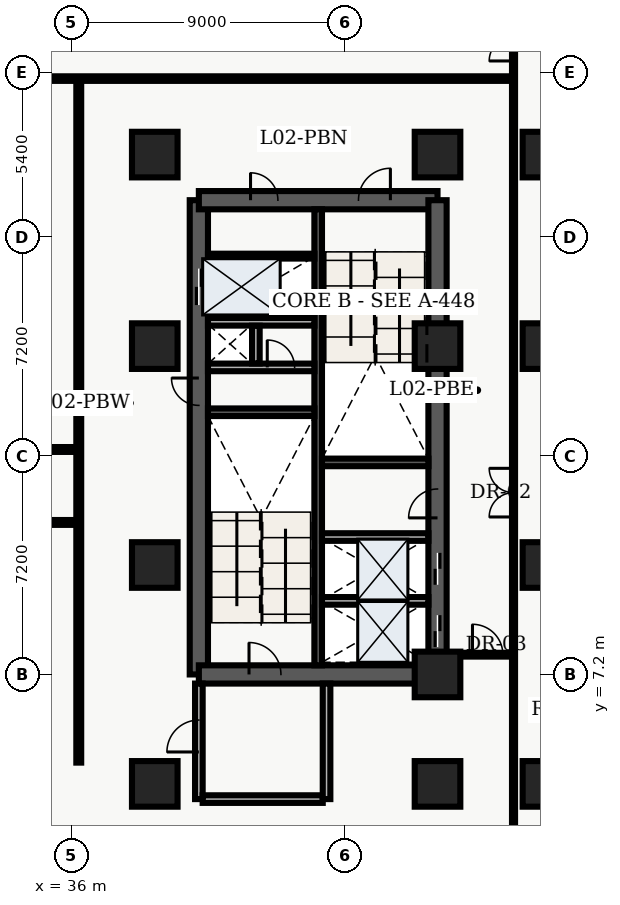
"""IFC4 building model, lengths in metres.
Left out: names, types, materials, properties, quantities, classifications, styles, units other than length and angle.
Written with IfcOpenShell. Run it as: python <this file> out.ifc"""

import sys

from ifc_helpers import new_model, entity, si_unit, converted_unit, direction, frame, origin_with_axes, origin_2d_with_axis, place, context, subcontext, project, spatial, polyline, rectangle, outline, extrude, element, fill, save


model = new_model("IFC4")
c1 = context("Model", 3, precision=1e-05, world=origin_with_axes(), true_north=direction((0.0, 1.0)))
c2 = subcontext(c1, "Body", "Model", "MODEL_VIEW")
j1 = project(units=[si_unit("LENGTHUNIT", "METRE"), converted_unit("PLANEANGLEUNIT", "DEGREE", entity("IfcPlaneAngleMeasure", 0.017), si_unit("PLANEANGLEUNIT", "RADIAN"), dimensions=[0, 0, 0, 0, 0, 0, 0])], contexts=[c1])
p1 = place(None, origin_with_axes())
s1 = spatial("IfcSite", under=j1, at=p1, CompositionType="ELEMENT")
p2 = place(p1, origin_with_axes())
s2 = spatial("IfcBuilding", under=s1, at=p2, CompositionType="ELEMENT")
p3 = place(p2, frame((0.0, 0.0, 10.8), z_axis=(0.0, 0.0, 1.0), x_axis=(1.0, 0.0, 0.0)))
s3 = spatial("IfcBuildingStorey", under=s2, at=p3, CompositionType="ELEMENT", Elevation=10.8)
p4 = place(p3, frame((40.2, 7.2, 0.0), z_axis=(0.0, 0.0, 1.0), x_axis=(0.0, 1.0, 0.0)))
e1 = element("IfcWall", 1, at=p4, inside=s3, PredefinedType="SHEAR", context=c2, shape_type="SweptSolid", body=[
    extrude(outline(polyline([(0.0, -0.3), (15.6, -0.3), (15.6, 0.3), (0.0, 0.3), (0.0, -0.3)])), origin_with_axes(), (0.0, 0.0, 1.0), 4.26),
])
p5 = place(p4, frame((12.75, 0.0, 0.0), z_axis=(0.0, 0.0, 1.0), x_axis=(1.0, 0.0, 0.0)))
e2 = element("IfcOpeningElement", 2, at=p5, cuts=e1, PredefinedType="OPENING", context=c2, shape_type="SweptSolid", body=[
    extrude(rectangle(XDim=1.2, YDim=0.62, at=origin_2d_with_axis()), origin_with_axes(), (0.0, 0.0, 1.0), 2.15),
])
p6 = place(p4, frame((9.3, 0.0, 0.0), z_axis=(0.0, 0.0, 1.0), x_axis=(1.0, 0.0, 0.0)))
e3 = element("IfcOpeningElement", 3, at=p6, cuts=e1, PredefinedType="OPENING", context=c2, shape_type="SweptSolid", body=[
    extrude(rectangle(XDim=0.9, YDim=0.62, at=origin_2d_with_axis()), origin_with_axes(), (0.0, 0.0, 1.0), 2.15),
])
p7 = place(p3, frame((40.2, 7.2, 0.0), z_axis=(0.0, 0.0, 1.0), x_axis=(1.0, 0.0, 0.0)))
e4 = element("IfcWall", 4, at=p7, inside=s3, PredefinedType="SHEAR", context=c2, shape_type="SweptSolid", body=[
    extrude(outline(polyline([(0.0, -0.3), (7.85, -0.3), (7.85, 0.3), (0.0, 0.3), (0.0, -0.3)])), origin_with_axes(), (0.0, 0.0, 1.0), 4.26),
])
p8 = place(p7, frame((2.175, 0.0, 0.0), z_axis=(0.0, 0.0, 1.0), x_axis=(1.0, 0.0, 0.0)))
e5 = element("IfcOpeningElement", 5, at=p8, cuts=e4, PredefinedType="OPENING", context=c2, shape_type="SweptSolid", body=[
    extrude(rectangle(XDim=1.05, YDim=0.62, at=origin_2d_with_axis()), origin_with_axes(), (0.0, 0.0, 1.0), 2.15),
])
p9 = place(p3, frame((40.2, 22.8, 0.0), z_axis=(0.0, 0.0, 1.0), x_axis=(1.0, 0.0, 0.0)))
e6 = element("IfcWall", 6, at=p9, inside=s3, PredefinedType="SHEAR", context=c2, shape_type="SweptSolid", body=[
    extrude(outline(polyline([(0.0, -0.3), (7.85, -0.3), (7.85, 0.3), (0.0, 0.3), (0.0, -0.3)])), origin_with_axes(), (0.0, 0.0, 1.0), 4.26),
])
p10 = place(p9, frame((5.775, 0.0, 0.0), z_axis=(0.0, 0.0, 1.0), x_axis=(1.0, 0.0, 0.0)))
e7 = element("IfcOpeningElement", 7, at=p10, cuts=e6, PredefinedType="OPENING", context=c2, shape_type="SweptSolid", body=[
    extrude(rectangle(XDim=1.05, YDim=0.62, at=origin_2d_with_axis()), origin_with_axes(), (0.0, 0.0, 1.0), 2.15),
])
p11 = place(p9, frame((2.15, 0.0, 0.0), z_axis=(0.0, 0.0, 1.0), x_axis=(1.0, 0.0, 0.0)))
e8 = element("IfcOpeningElement", 8, at=p11, cuts=e6, PredefinedType="OPENING", context=c2, shape_type="SweptSolid", body=[
    extrude(rectangle(XDim=0.9, YDim=0.62, at=origin_2d_with_axis()), origin_with_axes(), (0.0, 0.0, 1.0), 2.15),
])
p12 = place(p3, frame((48.05, 7.2, 0.0), z_axis=(0.0, 0.0, 1.0), x_axis=(0.0, 1.0, 0.0)))
e9 = element("IfcWall", 9, at=p12, inside=s3, PredefinedType="SHEAR", context=c2, shape_type="SweptSolid", body=[
    extrude(outline(polyline([(0.0, -0.3), (15.6, -0.3), (15.6, 0.3), (0.0, 0.3), (0.0, -0.3)])), origin_with_axes(), (0.0, 0.0, 1.0), 4.26),
])
p13 = place(p12, frame((1.425, 0.0, 0.0), z_axis=(0.0, 0.0, 1.0), x_axis=(1.0, 0.0, 0.0)))
e10 = element("IfcOpeningElement", 10, at=p13, cuts=e9, PredefinedType="OPENING", context=c2, shape_type="SweptSolid", body=[
    extrude(rectangle(XDim=1.05, YDim=0.62, at=origin_2d_with_axis()), origin_with_axes(), (0.0, 0.0, 1.0), 2.15),
])
p14 = place(p12, frame((3.475, 0.0, 0.0), z_axis=(0.0, 0.0, 1.0), x_axis=(1.0, 0.0, 0.0)))
e11 = element("IfcOpeningElement", 11, at=p14, cuts=e9, PredefinedType="OPENING", context=c2, shape_type="SweptSolid", body=[
    extrude(rectangle(XDim=1.05, YDim=0.62, at=origin_2d_with_axis()), origin_with_axes(), (0.0, 0.0, 1.0), 2.15),
])
p15 = place(p12, frame((5.625, 0.0, 0.0), z_axis=(0.0, 0.0, 1.0), x_axis=(1.0, 0.0, 0.0)))
e12 = element("IfcOpeningElement", 12, at=p15, cuts=e9, PredefinedType="OPENING", context=c2, shape_type="SweptSolid", body=[
    extrude(rectangle(XDim=0.95, YDim=0.62, at=origin_2d_with_axis()), origin_with_axes(), (0.0, 0.0, 1.0), 2.15),
])
p16 = place(p3, frame((44.125, 7.5, 0.0), z_axis=(0.0, 0.0, 1.0), x_axis=(0.0, 1.0, 0.0)))
e13 = element("IfcWall", 13, at=p16, inside=s3, PredefinedType="SHEAR", context=c2, shape_type="SweptSolid", body=[
    extrude(outline(polyline([(0.0, -0.125), (15.0, -0.125), (15.0, 0.125), (0.0, 0.125), (0.0, -0.125)])), origin_with_axes(), (0.0, 0.0, 1.0), 4.26),
])
for number, where, z_axis, x_axis in (
    (14, (40.5, 15.825, 0.0), (0.0, 0.0, 1.0), (1.0, 0.0, 0.0)),
    (15, (44.25, 14.175, 0.0), (0.0, 0.0, 1.0), (1.0, 0.0, 0.0)),
):
    element("IfcWall", number, at=place(p3, frame(where, z_axis=z_axis, x_axis=x_axis)), inside=s3, PredefinedType="SHEAR", context=c2, shape_type="SweptSolid", body=[
        extrude(outline(polyline([(0.0, -0.125), (3.5, -0.125), (3.5, 0.125), (0.0, 0.125), (0.0, -0.125)])), origin_with_axes(), (0.0, 0.0, 1.0), 4.26),
    ])
p17 = place(p3, frame((40.5, 17.3, 0.0), z_axis=(0.0, 0.0, 1.0), x_axis=(1.0, 0.0, 0.0)))
e16 = element("IfcWall", 16, at=p17, inside=s3, PredefinedType="SOLIDWALL", context=c2, shape_type="SweptSolid", body=[
    extrude(outline(polyline([(0.0, -0.125), (3.5, -0.125), (3.5, 0.125), (0.0, 0.125), (0.0, -0.125)])), origin_with_axes(), (0.0, 0.0, 1.0), 3.3),
])
p18 = place(p17, frame((2.4, 0.0, 0.0), z_axis=(0.0, 0.0, 1.0), x_axis=(1.0, 0.0, 0.0)))
e17 = element("IfcOpeningElement", 17, at=p18, cuts=e16, PredefinedType="OPENING", context=c2, shape_type="SweptSolid", body=[
    extrude(rectangle(XDim=0.9, YDim=0.27, at=origin_2d_with_axis()), origin_with_axes(), (0.0, 0.0, 1.0), 2.15),
])
p19 = place(p3, frame((40.5, 18.8, 0.0), z_axis=(0.0, 0.0, 1.0), x_axis=(1.0, 0.0, 0.0)))
e18 = element("IfcWall", 18, at=p19, inside=s3, PredefinedType="SOLIDWALL", context=c2, shape_type="SweptSolid", body=[
    extrude(outline(polyline([(0.0, -0.125), (3.5, -0.125), (3.5, 0.125), (0.0, 0.125), (0.0, -0.125)])), origin_with_axes(), (0.0, 0.0, 1.0), 3.3),
])
p20 = place(p3, frame((42.075, 17.43, 0.0), z_axis=(0.0, 0.0, 1.0), x_axis=(0.0, 1.0, 0.0)))
e19 = element("IfcWall", 19, at=p20, inside=s3, PredefinedType="SOLIDWALL", context=c2, shape_type="SweptSolid", body=[
    extrude(outline(polyline([(0.0, -0.125), (1.24, -0.125), (1.24, 0.125), (0.0, 0.125), (0.0, -0.125)])), origin_with_axes(), (0.0, 0.0, 1.0), 3.3),
])
p21 = place(p3, frame((40.2, 3.1, 0.0), z_axis=(0.0, 0.0, 1.0), x_axis=(0.0, 1.0, 0.0)))
e20 = element("IfcWall", 20, at=p21, inside=s3, PredefinedType="SOLIDWALL", context=c2, shape_type="SweptSolid", body=[
    extrude(outline(polyline([(0.0, -0.125), (3.8, -0.125), (3.8, 0.125), (0.0, 0.125), (0.0, -0.125)])), origin_with_axes(), (0.0, 0.0, 1.0), 3.3),
])
p22 = place(p21, frame((2.075, 0.0, 0.0), z_axis=(0.0, 0.0, 1.0), x_axis=(1.0, 0.0, 0.0)))
e21 = element("IfcOpeningElement", 21, at=p22, cuts=e20, PredefinedType="OPENING", context=c2, shape_type="SweptSolid", body=[
    extrude(rectangle(XDim=1.05, YDim=0.27, at=origin_2d_with_axis()), origin_with_axes(), (0.0, 0.0, 1.0), 2.15),
])
p23 = place(p3, frame((40.325, 3.1, 0.0), z_axis=(0.0, 0.0, 1.0), x_axis=(1.0, 0.0, 0.0)))
e22 = element("IfcWall", 22, at=p23, inside=s3, PredefinedType="SOLIDWALL", context=c2, shape_type="SweptSolid", body=[
    extrude(outline(polyline([(0.0, -0.125), (3.95, -0.125), (3.95, 0.125), (0.0, 0.125), (0.0, -0.125)])), origin_with_axes(), (0.0, 0.0, 1.0), 3.3),
])
p24 = place(p3, frame((44.4, 3.1, 0.0), z_axis=(0.0, 0.0, 1.0), x_axis=(0.0, 1.0, 0.0)))
e23 = element("IfcWall", 23, at=p24, inside=s3, PredefinedType="SOLIDWALL", context=c2, shape_type="SweptSolid", body=[
    extrude(outline(polyline([(0.0, -0.125), (3.8, -0.125), (3.8, 0.125), (0.0, 0.125), (0.0, -0.125)])), origin_with_axes(), (0.0, 0.0, 1.0), 3.3),
])
for number, where, z_axis, x_axis in (
    (24, (38.75, 3.6, 0.0), (0.0, 0.0, 1.0), (1.0, 0.0, 0.0)),
    (25, (38.75, 10.8, 0.0), (0.0, 0.0, 1.0), (1.0, 0.0, 0.0)),
    (26, (38.75, 18.0, 0.0), (0.0, 0.0, 1.0), (1.0, 0.0, 0.0)),
    (27, (38.75, 24.3, 0.0), (0.0, 0.0, 1.0), (1.0, 0.0, 0.0)),
    (28, (48.05, 3.6, 0.0), (0.0, 0.0, 1.0), (1.0, 0.0, 0.0)),
    (29, (48.05, 7.2, 0.0), (0.0, 0.0, 1.0), (1.0, 0.0, 0.0)),
    (30, (48.05, 18.0, 0.0), (0.0, 0.0, 1.0), (1.0, 0.0, 0.0)),
    (31, (48.05, 24.3, 0.0), (0.0, 0.0, 1.0), (1.0, 0.0, 0.0)),
    (32, (51.6, 3.6, 0.0), (0.0, 0.0, 1.0), (1.0, 0.0, 0.0)),
    (33, (51.6, 10.8, 0.0), (0.0, 0.0, 1.0), (1.0, 0.0, 0.0)),
    (34, (51.6, 18.0, 0.0), (0.0, 0.0, 1.0), (1.0, 0.0, 0.0)),
    (35, (51.6, 24.3, 0.0), (0.0, 0.0, 1.0), (1.0, 0.0, 0.0)),
):
    element("IfcColumn", number, at=place(p3, frame(where, z_axis=z_axis, x_axis=x_axis)), inside=s3, PredefinedType="COLUMN", context=c2, shape_type="SweptSolid", body=[
        extrude(rectangle(XDim=1.5, YDim=1.5, at=origin_2d_with_axis()), origin_with_axes(), (0.0, 0.0, 1.0), 4.5),
    ])
p25 = place(p3, frame((40.5, 20.96, 0.0), z_axis=(0.0, 0.0, 1.0), x_axis=(1.0, 0.0, 0.0)))
e36 = element("IfcWall", 36, at=p25, inside=s3, PredefinedType="PARTITIONING", context=c2, shape_type="SweptSolid", body=[
    extrude(outline(polyline([(0.0, -0.08), (3.5, -0.08), (3.5, 0.08), (0.0, 0.08), (0.0, -0.08)])), origin_with_axes(), (0.0, 0.0, 1.0), 3.2),
])
for number, where, z_axis, x_axis in (
    (37, (44.25, 9.62, 0.0), (0.0, 0.0, 1.0), (1.0, 0.0, 0.0)),
    (38, (44.25, 11.72, 0.0), (0.0, 0.0, 1.0), (1.0, 0.0, 0.0)),
):
    element("IfcWall", number, at=place(p3, frame(where, z_axis=z_axis, x_axis=x_axis)), inside=s3, PredefinedType="SOLIDWALL", context=c2, shape_type="SweptSolid", body=[
        extrude(outline(polyline([(0.0, -0.125), (3.5, -0.125), (3.5, 0.125), (0.0, 0.125), (0.0, -0.125)])), origin_with_axes(), (0.0, 0.0, 1.0), 3.2),
    ])
p26 = place(p3, frame((21.3, 12.2, 0.0), z_axis=(0.0, 0.0, 1.0), x_axis=(1.0, 0.0, 0.0)))
e39 = element("IfcWall", 39, at=p26, inside=s3, PredefinedType="PARTITIONING", context=c2, shape_type="SweptSolid", body=[
    extrude(outline(polyline([(0.0, -0.08), (14.95, -0.08), (14.95, 0.08), (0.0, 0.08), (0.0, -0.08)])), origin_with_axes(), (0.0, 0.0, 1.0), 3.2),
])
p27 = place(p26, frame((8.25, 0.0, 0.0), z_axis=(0.0, 0.0, 1.0), x_axis=(1.0, 0.0, 0.0)))
e40 = element("IfcOpeningElement", 40, at=p27, cuts=e39, PredefinedType="OPENING", context=c2, shape_type="SweptSolid", body=[
    extrude(rectangle(XDim=1.5, YDim=0.18, at=origin_2d_with_axis()), origin_with_axes(), (0.0, 0.0, 1.0), 2.2),
])
p28 = place(p3, frame((21.3, 14.6, 0.0), z_axis=(0.0, 0.0, 1.0), x_axis=(1.0, 0.0, 0.0)))
e41 = element("IfcWall", 41, at=p28, inside=s3, PredefinedType="PARTITIONING", context=c2, shape_type="SweptSolid", body=[
    extrude(outline(polyline([(0.0, -0.08), (14.95, -0.08), (14.95, 0.08), (0.0, 0.08), (0.0, -0.08)])), origin_with_axes(), (0.0, 0.0, 1.0), 3.2),
])
p29 = place(p28, frame((8.25, 0.0, 0.0), z_axis=(0.0, 0.0, 1.0), x_axis=(1.0, 0.0, 0.0)))
e42 = element("IfcOpeningElement", 42, at=p29, cuts=e41, PredefinedType="OPENING", context=c2, shape_type="SweptSolid", body=[
    extrude(rectangle(XDim=1.5, YDim=0.18, at=origin_2d_with_axis()), origin_with_axes(), (0.0, 0.0, 1.0), 2.2),
])
p30 = place(p3, frame((36.25, 4.3, 0.0), z_axis=(0.0, 0.0, 1.0), x_axis=(0.0, 1.0, 0.0)))
e43 = element("IfcWall", 43, at=p30, inside=s3, PredefinedType="PARTITIONING", context=c2, shape_type="SweptSolid", body=[
    extrude(outline(polyline([(0.0, -0.08), (22.5, -0.08), (22.5, 0.08), (0.0, 0.08), (0.0, -0.08)])), origin_with_axes(), (0.0, 0.0, 1.0), 3.2),
])
p31 = place(p3, frame((50.55, 0.38, 0.0), z_axis=(0.0, 0.0, 1.0), x_axis=(0.0, 1.0, 0.0)))
e44 = element("IfcWall", 44, at=p31, inside=s3, PredefinedType="PARTITIONING", context=c2, shape_type="SweptSolid", body=[
    extrude(outline(polyline([(0.0, -0.05), (38.84, -0.05), (38.84, 0.05), (0.0, 0.05), (0.0, -0.05)])), origin_with_axes(), (0.0, 0.0, 1.0), 3.2),
])
p32 = place(p31, frame((12.8, 0.0, 0.0), z_axis=(0.0, 0.0, 1.0), x_axis=(1.0, 0.0, 0.0)))
e45 = element("IfcOpeningElement", 45, at=p32, cuts=e44, PredefinedType="OPENING", context=c2, shape_type="SweptSolid", body=[
    extrude(rectangle(XDim=1.6, YDim=0.12, at=origin_2d_with_axis()), origin_with_axes(), (0.0, 0.0, 1.0), 2.2),
])
p33 = place(p31, frame((27.8, 0.0, 0.0), z_axis=(0.0, 0.0, 1.0), x_axis=(1.0, 0.0, 0.0)))
e46 = element("IfcOpeningElement", 46, at=p33, cuts=e44, PredefinedType="OPENING", context=c2, shape_type="SweptSolid", body=[
    extrude(rectangle(XDim=1.6, YDim=0.12, at=origin_2d_with_axis()), origin_with_axes(), (0.0, 0.0, 1.0), 2.2),
])
p34 = place(p3, frame((48.05, 7.85, 0.0), z_axis=(0.0, 0.0, 1.0), x_axis=(1.0, 0.0, 0.0)))
e47 = element("IfcWall", 47, at=p34, inside=s3, PredefinedType="PARTITIONING", context=c2, shape_type="SweptSolid", body=[
    extrude(outline(polyline([(0.0, -0.062), (2.5, -0.062), (2.5, 0.062), (0.0, 0.062), (0.0, -0.062)])), origin_with_axes(), (0.0, 0.0, 1.0), 3.2),
])
p35 = place(p34, frame((1.65, 0.0, 0.0), z_axis=(0.0, 0.0, 1.0), x_axis=(1.0, 0.0, 0.0)))
e48 = element("IfcOpeningElement", 48, at=p35, cuts=e47, PredefinedType="OPENING", context=c2, shape_type="SweptSolid", body=[
    extrude(rectangle(XDim=1.0, YDim=0.145, at=origin_2d_with_axis()), origin_with_axes(), (0.0, 0.0, 1.0), 2.15),
])
p36 = place(p3, frame((21.3, 26.8, 0.0), z_axis=(0.0, 0.0, 1.0), x_axis=(1.0, 0.0, 0.0)))
e49 = element("IfcWall", 49, at=p36, inside=s3, PredefinedType="PARTITIONING", context=c2, shape_type="SweptSolid", body=[
    extrude(outline(polyline([(0.0, -0.075), (29.25, -0.075), (29.25, 0.075), (0.0, 0.075), (0.0, -0.075)])), origin_with_axes(), (0.0, 0.0, 1.0), 3.2),
])
p37 = place(p12, frame((1.425, 0.0, 0.0), z_axis=(0.0, 0.0, 1.0), x_axis=(1.0, 0.0, 0.0)))
e50 = element("IfcDoor", 50, at=p37, inside=s3, OperationType="SLIDING_TO_LEFT", PredefinedType="DOOR", context=c2, shape_type="SweptSolid", body=[
    extrude(rectangle(XDim=1.05, YDim=0.09, at=origin_2d_with_axis()), origin_with_axes(), (0.0, 0.0, 1.0), 2.15),
])
fill(e10, e50)
p38 = place(p12, frame((3.475, 0.0, 0.0), z_axis=(0.0, 0.0, 1.0), x_axis=(1.0, 0.0, 0.0)))
e51 = element("IfcDoor", 51, at=p38, inside=s3, OperationType="SLIDING_TO_RIGHT", PredefinedType="DOOR", context=c2, shape_type="SweptSolid", body=[
    extrude(rectangle(XDim=1.05, YDim=0.09, at=origin_2d_with_axis()), origin_with_axes(), (0.0, 0.0, 1.0), 2.15),
])
fill(e11, e51)
p39 = place(p4, frame((12.75, 0.0, 0.0), z_axis=(0.0, 0.0, 1.0), x_axis=(1.0, 0.0, 0.0)))
e52 = element("IfcDoor", 52, at=p39, inside=s3, OperationType="DOUBLE_DOOR_SLIDING", PredefinedType="DOOR", context=c2, shape_type="SweptSolid", body=[
    extrude(rectangle(XDim=1.2, YDim=0.09, at=origin_2d_with_axis()), origin_with_axes(), (0.0, 0.0, 1.0), 2.15),
])
fill(e2, e52)
p40 = place(p4, frame((9.3, 0.0, 0.0), z_axis=(0.0, 0.0, 1.0), x_axis=(1.0, 0.0, 0.0)))
e53 = element("IfcDoor", 53, at=p40, inside=s3, OperationType="SINGLE_SWING_RIGHT", PredefinedType="DOOR", context=c2, shape_type="SweptSolid", body=[
    extrude(rectangle(XDim=0.9, YDim=0.09, at=origin_2d_with_axis()), origin_with_axes(), (0.0, 0.0, 1.0), 2.15),
])
fill(e3, e53)
p41 = place(p17, frame((2.4, 0.0, 0.0), z_axis=(0.0, 0.0, 1.0), x_axis=(1.0, 0.0, 0.0)))
e54 = element("IfcDoor", 54, at=p41, inside=s3, OperationType="SINGLE_SWING_LEFT", PredefinedType="DOOR", context=c2, shape_type="SweptSolid", body=[
    extrude(rectangle(XDim=0.9, YDim=0.09, at=origin_2d_with_axis()), origin_with_axes(), (0.0, 0.0, 1.0), 2.15),
])
fill(e17, e54)
p42 = place(p7, frame((2.175, 0.0, 0.0), z_axis=(0.0, 0.0, 1.0), x_axis=(1.0, 0.0, 0.0)))
e55 = element("IfcDoor", 55, at=p42, inside=s3, OperationType="SINGLE_SWING_LEFT", PredefinedType="DOOR", context=c2, shape_type="SweptSolid", body=[
    extrude(rectangle(XDim=1.05, YDim=0.09, at=origin_2d_with_axis()), origin_with_axes(), (0.0, 0.0, 1.0), 2.15),
])
fill(e5, e55)
p43 = place(p9, frame((5.775, 0.0, 0.0), z_axis=(0.0, 0.0, 1.0), x_axis=(1.0, 0.0, 0.0)))
e56 = element("IfcDoor", 56, at=p43, inside=s3, OperationType="SINGLE_SWING_RIGHT", PredefinedType="DOOR", context=c2, shape_type="SweptSolid", body=[
    extrude(rectangle(XDim=1.05, YDim=0.09, at=origin_2d_with_axis()), origin_with_axes(), (0.0, 0.0, 1.0), 2.15),
])
fill(e7, e56)
p44 = place(p21, frame((2.075, 0.0, 0.0), z_axis=(0.0, 0.0, 1.0), x_axis=(1.0, 0.0, 0.0)))
e57 = element("IfcDoor", 57, at=p44, inside=s3, OperationType="SINGLE_SWING_LEFT", PredefinedType="DOOR", context=c2, shape_type="SweptSolid", body=[
    extrude(rectangle(XDim=1.05, YDim=0.09, at=origin_2d_with_axis()), origin_with_axes(), (0.0, 0.0, 1.0), 2.15),
])
fill(e21, e57)
p45 = place(p9, frame((2.15, 0.0, 0.0), z_axis=(0.0, 0.0, 1.0), x_axis=(1.0, 0.0, 0.0)))
e58 = element("IfcDoor", 58, at=p45, inside=s3, OperationType="SINGLE_SWING_LEFT", PredefinedType="DOOR", context=c2, shape_type="SweptSolid", body=[
    extrude(rectangle(XDim=0.9, YDim=0.09, at=origin_2d_with_axis()), origin_with_axes(), (0.0, 0.0, 1.0), 2.15),
])
fill(e8, e58)
p46 = place(p12, frame((5.625, 0.0, 0.0), z_axis=(0.0, 0.0, 1.0), x_axis=(1.0, 0.0, 0.0)))
e59 = element("IfcDoor", 59, at=p46, inside=s3, OperationType="SINGLE_SWING_LEFT", PredefinedType="DOOR", context=c2, shape_type="SweptSolid", body=[
    extrude(rectangle(XDim=0.95, YDim=0.09, at=origin_2d_with_axis()), origin_with_axes(), (0.0, 0.0, 1.0), 2.15),
])
fill(e12, e59)
p47 = place(p34, frame((1.65, 0.0, 0.0), z_axis=(0.0, 0.0, 1.0), x_axis=(1.0, 0.0, 0.0)))
e60 = element("IfcDoor", 60, at=p47, inside=s3, OperationType="SINGLE_SWING_LEFT", PredefinedType="DOOR", context=c2, shape_type="SweptSolid", body=[
    extrude(rectangle(XDim=1.0, YDim=0.075, at=origin_2d_with_axis()), origin_with_axes(), (0.0, 0.0, 1.0), 2.15),
])
fill(e48, e60)
p48 = place(p31, frame((12.8, 0.0, 0.0), z_axis=(0.0, 0.0, 1.0), x_axis=(1.0, 0.0, 0.0)))
e61 = element("IfcDoor", 61, at=p48, inside=s3, OperationType="DOUBLE_DOOR_SINGLE_SWING", PredefinedType="DOOR", context=c2, shape_type="SweptSolid", body=[
    extrude(rectangle(XDim=1.6, YDim=0.06, at=origin_2d_with_axis()), origin_with_axes(), (0.0, 0.0, 1.0), 2.2),
])
fill(e45, e61)
p49 = place(p31, frame((27.8, 0.0, 0.0), z_axis=(0.0, 0.0, 1.0), x_axis=(1.0, 0.0, 0.0)))
e62 = element("IfcDoor", 62, at=p49, inside=s3, OperationType="DOUBLE_DOOR_SINGLE_SWING", PredefinedType="DOOR", context=c2, shape_type="SweptSolid", body=[
    extrude(rectangle(XDim=1.6, YDim=0.06, at=origin_2d_with_axis()), origin_with_axes(), (0.0, 0.0, 1.0), 2.2),
])
fill(e46, e62)
save(model, sys.argv[1])
